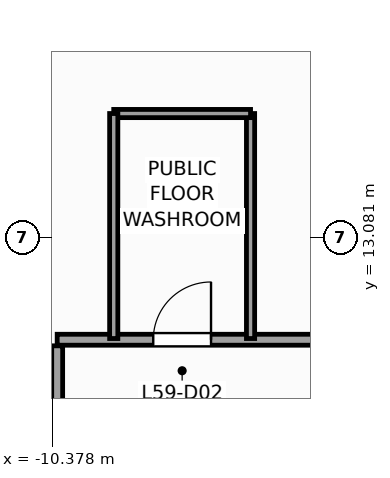
"""IFC4 building model, lengths in metres.
Left out: names, types, materials, properties, quantities, classifications, styles, units other than length and angle.
Written with IfcOpenShell. Run it as: python <this file> out.ifc"""

import sys

from ifc_helpers import new_model, si_unit, direction, frame, frame_2d, origin, place, context, subcontext, project, spatial, rectangle, extrude, source, transform, mapped, element, fill, save


model = new_model("IFC4")
c1 = context("Model", 3, precision=1e-05, world=origin(), true_north=direction((0.0, 1.0)))
c2 = subcontext(c1, "Body", "Model", "MODEL_VIEW")
j1 = project(units=[si_unit("LENGTHUNIT", "METRE"), si_unit("PLANEANGLEUNIT", "RADIAN")], contexts=[c1])
p1 = place(None, origin())
s1 = spatial("IfcSite", under=j1, at=p1, CompositionType="ELEMENT")
p2 = place(p1, origin())
s2 = spatial("IfcBuilding", under=s1, at=p2, CompositionType="ELEMENT")
p3 = place(p2, frame((0.0, 0.0, 244.6)))
s3 = spatial("IfcBuildingStorey", under=s2, at=p3, CompositionType="ELEMENT", Elevation=244.6)
p4 = place(p3, frame((-6.733, 29.154, 0.0), z_axis=(0.0, 0.0, 1.0), x_axis=(-0.629325378072, -0.77714192302, 0.0)))
e1 = element("IfcWall", 1, at=p4, inside=s3, PredefinedType="STANDARD", context=c2, shape_type="SweptSolid", body=[
    extrude(rectangle(XDim=36.84, YDim=0.34, at=frame_2d((18.42, 0.0))), origin(), (0.0, 0.0, 1.0), 2.96),
])
p5 = place(p4, frame((23.495, 0.0, 0.0)))
e2 = element("IfcOpeningElement", 2, at=p5, cuts=e1, PredefinedType="OPENING", context=c2, shape_type="SweptSolid", body=[
    extrude(rectangle(XDim=1.05, YDim=2.25, at=frame_2d((0.525, 1.125))), frame((0.0, 0.18, 0.0), z_axis=(0.0, -1.0, 0.0), x_axis=(1.0, 0.0, 0.0)), (0.0, 0.0, 1.0), 0.36),
])
p6 = place(p4, frame((3.721, 0.0, 0.48)))
e3 = element("IfcOpeningElement", 3, at=p6, cuts=e1, PredefinedType="OPENING", context=c2, shape_type="SweptSolid", body=[
    extrude(rectangle(XDim=1.4, YDim=2.4, at=frame_2d((0.7, 1.2))), frame((0.0, 0.18, 0.0), z_axis=(0.0, -1.0, 0.0), x_axis=(1.0, 0.0, 0.0)), (0.0, 0.0, 1.0), 0.36),
])
p7 = place(p4, frame((9.809, 0.0, 0.58)))
e4 = element("IfcOpeningElement", 4, at=p7, cuts=e1, PredefinedType="OPENING", context=c2, shape_type="SweptSolid", body=[
    extrude(rectangle(XDim=1.75, YDim=2.3, at=frame_2d((0.875, 1.15))), frame((0.0, 0.18, 0.0), z_axis=(0.0, -1.0, 0.0), x_axis=(1.0, 0.0, 0.0)), (0.0, 0.0, 1.0), 0.36),
])
p8 = place(p4, frame((16.058, 0.0, 0.58)))
e5 = element("IfcOpeningElement", 5, at=p8, cuts=e1, PredefinedType="OPENING", context=c2, shape_type="SweptSolid", body=[
    extrude(rectangle(XDim=1.75, YDim=2.3, at=frame_2d((0.875, 1.15))), frame((0.0, 0.18, 0.0), z_axis=(0.0, -1.0, 0.0), x_axis=(1.0, 0.0, 0.0)), (0.0, 0.0, 1.0), 0.36),
])
p9 = place(p4, frame((25.676, 0.0, 0.58)))
e6 = element("IfcOpeningElement", 6, at=p9, cuts=e1, PredefinedType="OPENING", context=c2, shape_type="SweptSolid", body=[
    extrude(rectangle(XDim=1.75, YDim=2.3, at=frame_2d((0.875, 1.15))), frame((0.0, 0.18, 0.0), z_axis=(0.0, -1.0, 0.0), x_axis=(1.0, 0.0, 0.0)), (0.0, 0.0, 1.0), 0.36),
])
p10 = place(p4, frame((30.982, 0.0, 0.48)))
e7 = element("IfcOpeningElement", 7, at=p10, cuts=e1, PredefinedType="OPENING", context=c2, shape_type="SweptSolid", body=[
    extrude(rectangle(XDim=1.4, YDim=2.4, at=frame_2d((0.7, 1.2))), frame((0.0, 0.18, 0.0), z_axis=(0.0, -1.0, 0.0), x_axis=(1.0, 0.0, 0.0)), (0.0, 0.0, 1.0), 0.36),
])
p11 = place(p3, frame((-10.3, 11.4, 0.0), z_axis=(0.0, 0.0, 1.0), x_axis=(1.0, 0.0, 0.0)))
e8 = element("IfcWall", 8, at=p11, inside=s3, PredefinedType="PARTITIONING", context=c2, shape_type="SweptSolid", body=[
    extrude(rectangle(XDim=22.75, YDim=0.18, at=frame_2d((11.375, 0.0))), origin(), (0.0, 0.0, 1.0), 3.66),
])
p12 = place(p11, frame((11.136, 0.0, 0.0)))
e9 = element("IfcOpeningElement", 9, at=p12, cuts=e8, PredefinedType="OPENING", context=c2, shape_type="SweptSolid", body=[
    extrude(rectangle(XDim=0.95, YDim=2.1, at=frame_2d((0.475, 1.05))), frame((0.0, 0.1, 0.0), z_axis=(0.0, -1.0, 0.0), x_axis=(1.0, 0.0, 0.0)), (0.0, 0.0, 1.0), 0.2),
])
p13 = place(p11, frame((1.58, 0.0, 0.0)))
e10 = element("IfcOpeningElement", 10, at=p13, cuts=e8, PredefinedType="OPENING", context=c2, shape_type="SweptSolid", body=[
    extrude(rectangle(XDim=0.95, YDim=2.1, at=frame_2d((0.475, 1.05))), frame((0.0, 0.1, 0.0), z_axis=(0.0, -1.0, 0.0), x_axis=(1.0, 0.0, 0.0)), (0.0, 0.0, 1.0), 0.2),
])
p14 = place(p3, frame((-10.3, -10.2, 0.0), z_axis=(0.0, 0.0, 1.0), x_axis=(0.0, 1.0, 0.0)))
e11 = element("IfcWall", 11, at=p14, inside=s3, PredefinedType="PARTITIONING", context=c2, shape_type="SweptSolid", body=[
    extrude(rectangle(XDim=21.5, YDim=0.18, at=frame_2d((10.75, 0.0))), origin(), (0.0, 0.0, 1.0), 3.66),
])
p15 = place(p14, frame((15.135, 0.0, 0.0)))
e12 = element("IfcOpeningElement", 12, at=p15, cuts=e11, PredefinedType="OPENING", context=c2, shape_type="SweptSolid", body=[
    extrude(rectangle(XDim=1.1, YDim=2.2, at=frame_2d((0.55, 1.1))), frame((0.0, 0.1, 0.0), z_axis=(0.0, -1.0, 0.0), x_axis=(1.0, 0.0, 0.0)), (0.0, 0.0, 1.0), 0.2),
])
p16 = place(p14, frame((6.25, 0.0, 0.0)))
e13 = element("IfcOpeningElement", 13, at=p16, cuts=e11, PredefinedType="OPENING", context=c2, shape_type="SweptSolid", body=[
    extrude(rectangle(XDim=1.1, YDim=2.2, at=frame_2d((0.55, 1.1))), frame((0.0, 0.1, 0.0), z_axis=(0.0, -1.0, 0.0), x_axis=(1.0, 0.0, 0.0)), (0.0, 0.0, 1.0), 0.2),
])
p17 = place(p3, frame((-7.12, 11.42, 0.0), z_axis=(0.0, 0.0, 1.0), x_axis=(0.0, 1.0, 0.0)))
e14 = element("IfcWall", 14, at=p17, inside=s3, PredefinedType="PARTITIONING", context=c2, shape_type="SweptSolid", body=[
    extrude(rectangle(XDim=3.7, YDim=0.135, at=frame_2d((1.85, 0.0))), origin(), (0.0, 0.0, 1.0), 3.66),
])
p18 = place(p3, frame((-9.37, 15.12, 0.0), z_axis=(0.0, 0.0, 1.0), x_axis=(1.0, 0.0, 0.0)))
e15 = element("IfcWall", 15, at=p18, inside=s3, PredefinedType="PARTITIONING", context=c2, shape_type="SweptSolid", body=[
    extrude(rectangle(XDim=2.25, YDim=0.135, at=frame_2d((1.125, 0.0))), origin(), (0.0, 0.0, 1.0), 3.66),
])
p19 = place(p3, frame((-9.37, 11.42, 0.0), z_axis=(0.0, 0.0, 1.0), x_axis=(0.0, 1.0, 0.0)))
e16 = element("IfcWall", 16, at=p19, inside=s3, PredefinedType="PARTITIONING", context=c2, shape_type="SweptSolid", body=[
    extrude(rectangle(XDim=3.7, YDim=0.135, at=frame_2d((1.85, 0.0))), origin(), (0.0, 0.0, 1.0), 3.66),
])
m1 = source(origin(), c2, "Body", "SweptSolid", [
    extrude(rectangle(XDim=0.95, YDim=2.1, at=frame_2d((0.475, 1.05))), frame((0.0, 0.025, 0.0), z_axis=(0.0, -1.0, 0.0), x_axis=(1.0, 0.0, 0.0)), (0.0, 0.0, 1.0), 0.05),
])
p20 = place(p13, origin())
e17 = element("IfcDoor", 17, at=p20, inside=s3, OperationType="SINGLE_SWING_RIGHT", PredefinedType="DOOR", context=c2, shape_type="MappedRepresentation", body=[
    mapped(m1, transform((0.0, 0.0, 0.0), scale=1.0)),
])
fill(e10, e17)
save(model, sys.argv[1])
